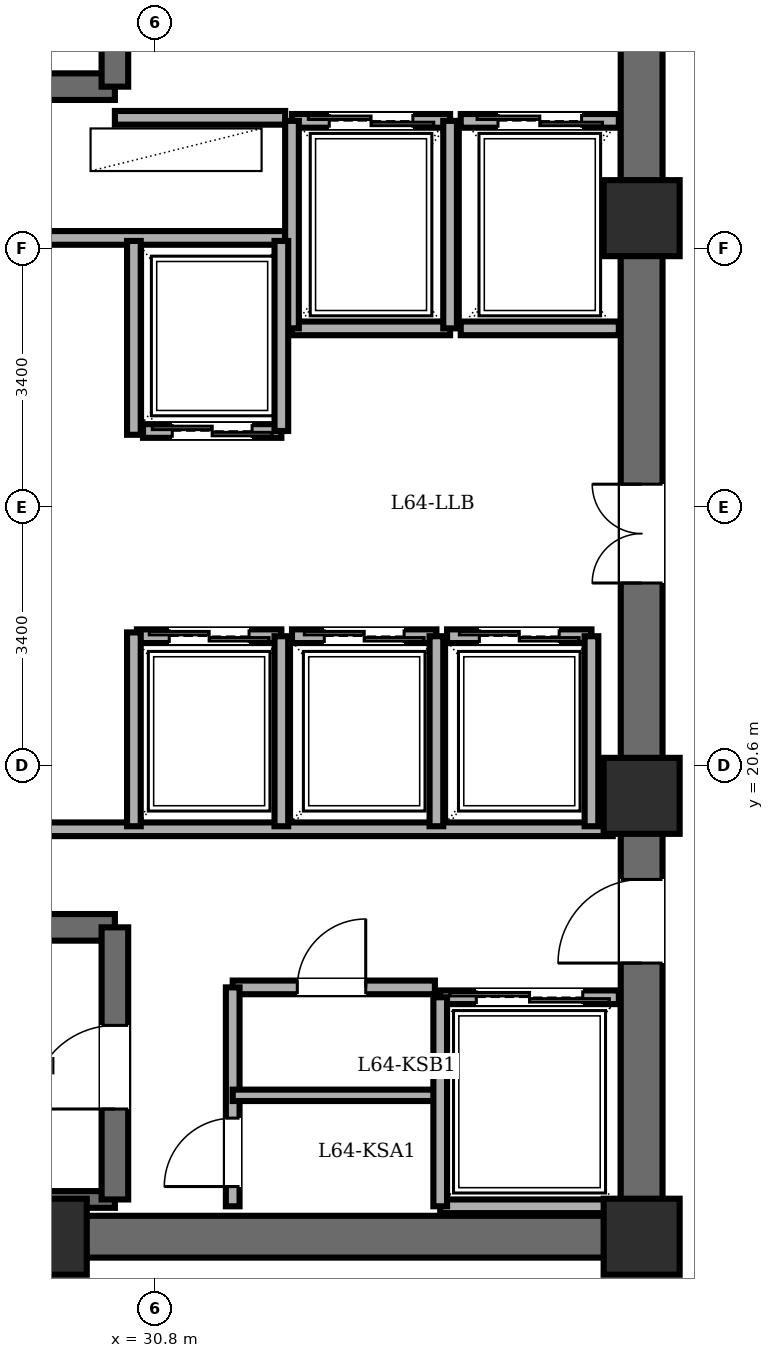
"""IFC4 building model, lengths in metres.
Left out: names, types, materials, properties, quantities, classifications, styles, units other than length and angle.
Written with IfcOpenShell. Run it as: python <this file> out.ifc"""

import sys

from ifc_helpers import new_model, si_unit, direction, frame, frame_2d, origin, origin_2d, place, context, subcontext, project, spatial, rectangle, extrude, element, fill, save


model = new_model("IFC4")
c1 = context("Model", 3, precision=1e-05, world=origin(), true_north=direction((0.0, 1.0)))
c2 = subcontext(c1, "Body", "Model", "MODEL_VIEW")
j1 = project(units=[si_unit("LENGTHUNIT", "METRE"), si_unit("PLANEANGLEUNIT", "RADIAN")], contexts=[c1])
p1 = place(None, origin())
s1 = spatial("IfcSite", under=j1, at=p1, CompositionType="ELEMENT")
p2 = place(p1, origin())
s2 = spatial("IfcBuilding", under=s1, at=p2, CompositionType="ELEMENT")
p3 = place(p2, frame((0.0, 0.0, 244.5)))
s3 = spatial("IfcBuildingStorey", under=s2, at=p3, CompositionType="ELEMENT", Elevation=244.5)
for number, where, z_axis, x_axis in (
    (1, (29.4, 14.4, 0.0), (0.0, 0.0, 1.0), (1.0, 0.0, 0.0)),
    (2, (37.2, 14.4, 0.0), (0.0, 0.0, 1.0), (1.0, 0.0, 0.0)),
    (3, (37.2, 20.2, 0.0), (0.0, 0.0, 1.0), (1.0, 0.0, 0.0)),
    (4, (37.2, 27.8, 0.0), (0.0, 0.0, 1.0), (1.0, 0.0, 0.0)),
):
    element("IfcColumn", number, at=place(p3, frame(where, z_axis=z_axis, x_axis=x_axis)), inside=s3, PredefinedType="COLUMN", context=c2, shape_type="SweptSolid", body=[
        extrude(rectangle(XDim=1.0, YDim=1.0, at=origin_2d()), origin(), (0.0, 0.0, 1.0), 3.6),
    ])
p4 = place(p3, frame((37.2, 14.4, 0.0), z_axis=(0.0, 0.0, 1.0), x_axis=(-1.0, 0.0, 0.0)))
e5 = element("IfcWall", 5, at=p4, inside=s3, PredefinedType="SHEAR", context=c2, shape_type="SweptSolid", body=[
    extrude(rectangle(XDim=15.6, YDim=0.55, at=frame_2d((7.8, 0.0))), origin(), (0.0, 0.0, 1.0), 3.36),
])
p5 = place(p3, frame((37.2, 14.4, 0.0), z_axis=(0.0, 0.0, 1.0), x_axis=(0.0, 1.0, 0.0)))
e6 = element("IfcWall", 6, at=p5, inside=s3, PredefinedType="SHEAR", context=c2, shape_type="SweptSolid", body=[
    extrude(rectangle(XDim=19.2, YDim=0.55, at=frame_2d((9.6, 0.0))), origin(), (0.0, 0.0, 1.0), 3.36),
])
p6 = place(p5, frame((15.8, 0.0, 0.0)))
e7 = element("IfcOpeningElement", 7, at=p6, cuts=e6, PredefinedType="OPENING", context=c2, shape_type="SweptSolid", body=[
    extrude(rectangle(XDim=1.15, YDim=2.15, at=frame_2d((0.575, 1.075))), frame((0.0, 0.285, 0.0), z_axis=(0.0, -1.0, 0.0), x_axis=(1.0, 0.0, 0.0)), (0.0, 0.0, 1.0), 0.57),
])
p7 = place(p5, frame((3.6, 0.0, 0.0)))
e8 = element("IfcOpeningElement", 8, at=p7, cuts=e6, PredefinedType="OPENING", context=c2, shape_type="SweptSolid", body=[
    extrude(rectangle(XDim=1.1, YDim=2.15, at=frame_2d((0.55, 1.075))), frame((0.0, 0.285, 0.0), z_axis=(0.0, -1.0, 0.0), x_axis=(1.0, 0.0, 0.0)), (0.0, 0.0, 1.0), 0.57),
])
p8 = place(p5, frame((8.6, 0.0, 0.0)))
e9 = element("IfcOpeningElement", 9, at=p8, cuts=e6, PredefinedType="OPENING", context=c2, shape_type="SweptSolid", body=[
    extrude(rectangle(XDim=1.3, YDim=2.2, at=frame_2d((0.65, 1.1))), frame((0.0, 0.285, 0.0), z_axis=(0.0, -1.0, 0.0), x_axis=(1.0, 0.0, 0.0)), (0.0, 0.0, 1.0), 0.57),
])
p9 = place(p3, frame((22.48, 29.53, 0.0), z_axis=(0.0, 0.0, 1.0), x_axis=(1.0, 0.0, 0.0)))
e10 = element("IfcWall", 10, at=p9, inside=s3, PredefinedType="SOLIDWALL", context=c2, shape_type="SweptSolid", body=[
    extrude(rectangle(XDim=7.79, YDim=0.35, at=frame_2d((3.895, 0.0))), origin(), (0.0, 0.0, 1.0), 3.36),
])
p10 = place(p3, frame((30.27, 29.53, 0.0), z_axis=(0.0, 0.0, 1.0), x_axis=(0.0, 1.0, 0.0)))
e11 = element("IfcWall", 11, at=p10, inside=s3, PredefinedType="SOLIDWALL", context=c2, shape_type="SweptSolid", body=[
    extrude(rectangle(XDim=3.58, YDim=0.35, at=frame_2d((1.79, 0.0))), origin(), (0.0, 0.0, 1.0), 3.36),
])
p11 = place(p10, frame((1.25, 0.0, 0.0)))
e12 = element("IfcOpeningElement", 12, at=p11, cuts=e11, PredefinedType="OPENING", context=c2, shape_type="SweptSolid", body=[
    extrude(rectangle(XDim=1.1, YDim=2.15, at=frame_2d((0.55, 1.075))), frame((0.0, 0.185, 0.0), z_axis=(0.0, -1.0, 0.0), x_axis=(1.0, 0.0, 0.0)), (0.0, 0.0, 1.0), 0.37),
])
p12 = place(p3, frame((22.48, 18.47, 0.0), z_axis=(0.0, 0.0, 1.0), x_axis=(1.0, 0.0, 0.0)))
e13 = element("IfcWall", 13, at=p12, inside=s3, PredefinedType="SOLIDWALL", context=c2, shape_type="SweptSolid", body=[
    extrude(rectangle(XDim=7.79, YDim=0.35, at=frame_2d((3.895, 0.0))), origin(), (0.0, 0.0, 1.0), 3.36),
])
p13 = place(p3, frame((22.48, 14.89, 0.0), z_axis=(0.0, 0.0, 1.0), x_axis=(1.0, 0.0, 0.0)))
e14 = element("IfcWall", 14, at=p13, inside=s3, PredefinedType="PARTITIONING", context=c2, shape_type="SweptSolid", body=[
    extrude(rectangle(XDim=7.79, YDim=0.22, at=frame_2d((3.895, 0.0))), origin(), (0.0, 0.0, 1.0), 3.36),
])
p14 = place(p3, frame((30.27, 14.89, 0.0), z_axis=(0.0, 0.0, 1.0), x_axis=(0.0, 1.0, 0.0)))
e15 = element("IfcWall", 15, at=p14, inside=s3, PredefinedType="SOLIDWALL", context=c2, shape_type="SweptSolid", body=[
    extrude(rectangle(XDim=3.58, YDim=0.35, at=frame_2d((1.79, 0.0))), origin(), (0.0, 0.0, 1.0), 3.36),
])
p15 = place(p14, frame((1.19, 0.0, 0.0)))
e16 = element("IfcOpeningElement", 16, at=p15, cuts=e15, PredefinedType="OPENING", context=c2, shape_type="SweptSolid", body=[
    extrude(rectangle(XDim=1.1, YDim=2.15, at=frame_2d((0.55, 1.075))), frame((0.0, 0.185, 0.0), z_axis=(0.0, -1.0, 0.0), x_axis=(1.0, 0.0, 0.0)), (0.0, 0.0, 1.0), 0.37),
])
p16 = place(p3, frame((30.27, 29.12, 0.0), z_axis=(0.0, 0.0, 1.0), x_axis=(1.0, 0.0, 0.0)))
e17 = element("IfcWall", 17, at=p16, inside=s3, PredefinedType="PARTITIONING", context=c2, shape_type="SweptSolid", body=[
    extrude(rectangle(XDim=2.24, YDim=0.18, at=frame_2d((1.12, 0.0))), origin(), (0.0, 0.0, 1.0), 3.36),
])
p17 = place(p3, frame((21.95, 27.54, 0.0), z_axis=(0.0, 0.0, 1.0), x_axis=(1.0, 0.0, 0.0)))
e18 = element("IfcWall", 18, at=p17, inside=s3, PredefinedType="PARTITIONING", context=c2, shape_type="SweptSolid", body=[
    extrude(rectangle(XDim=10.56, YDim=0.18, at=frame_2d((5.28, 0.0))), origin(), (0.0, 0.0, 1.0), 3.36),
])
p18 = place(p3, frame((21.95, 19.76, 0.0), z_axis=(0.0, 0.0, 1.0), x_axis=(1.0, 0.0, 0.0)))
e19 = element("IfcWall", 19, at=p18, inside=s3, PredefinedType="PARTITIONING", context=c2, shape_type="SweptSolid", body=[
    extrude(rectangle(XDim=14.87, YDim=0.18, at=frame_2d((7.435, 0.0))), origin(), (0.0, 0.0, 1.0), 3.36),
])
p19 = place(p3, frame((31.82, 17.68, 0.0), z_axis=(0.0, 0.0, 1.0), x_axis=(1.0, 0.0, 0.0)))
e20 = element("IfcWall", 20, at=p19, inside=s3, PredefinedType="PARTITIONING", context=c2, shape_type="SweptSolid", body=[
    extrude(rectangle(XDim=2.66, YDim=0.18, at=frame_2d((1.33, 0.0))), origin(), (0.0, 0.0, 1.0), 3.36),
])
p20 = place(p19, frame((0.85, 0.0, 0.0)))
e21 = element("IfcOpeningElement", 21, at=p20, cuts=e20, PredefinedType="OPENING", context=c2, shape_type="SweptSolid", body=[
    extrude(rectangle(XDim=0.9, YDim=2.05, at=frame_2d((0.45, 1.025))), frame((0.0, 0.1, 0.0), z_axis=(0.0, -1.0, 0.0), x_axis=(1.0, 0.0, 0.0)), (0.0, 0.0, 1.0), 0.2),
])
p21 = place(p3, frame((31.82, 14.8, 0.0), z_axis=(0.0, 0.0, 1.0), x_axis=(0.0, 1.0, 0.0)))
e22 = element("IfcWall", 22, at=p21, inside=s3, PredefinedType="PARTITIONING", context=c2, shape_type="SweptSolid", body=[
    extrude(rectangle(XDim=2.88, YDim=0.18, at=frame_2d((1.44, 0.0))), origin(), (0.0, 0.0, 1.0), 3.36),
])
p22 = place(p21, frame((0.26, 0.0, 0.0)))
e23 = element("IfcOpeningElement", 23, at=p22, cuts=e22, PredefinedType="OPENING", context=c2, shape_type="SweptSolid", body=[
    extrude(rectangle(XDim=0.9, YDim=2.05, at=frame_2d((0.45, 1.025))), frame((0.0, 0.1, 0.0), z_axis=(0.0, -1.0, 0.0), x_axis=(1.0, 0.0, 0.0)), (0.0, 0.0, 1.0), 0.2),
])
p23 = place(p3, frame((31.82, 16.26, 0.0), z_axis=(0.0, 0.0, 1.0), x_axis=(1.0, 0.0, 0.0)))
e24 = element("IfcWall", 24, at=p23, inside=s3, PredefinedType="PARTITIONING", context=c2, shape_type="SweptSolid", body=[
    extrude(rectangle(XDim=2.66, YDim=0.15, at=frame_2d((1.33, 0.0))), origin(), (0.0, 0.0, 1.0), 3.36),
])
p24 = place(p3, frame((32.6, 29.08, 0.0), z_axis=(0.0, 0.0, 1.0), x_axis=(1.0, 0.0, 0.0)))
e25 = element("IfcWall", 25, at=p24, inside=s3, PredefinedType="PARTITIONING", context=c2, shape_type="SweptSolid", body=[
    extrude(rectangle(XDim=2.08, YDim=0.18, at=frame_2d((1.04, 0.0))), origin(), (0.0, 0.0, 1.0), 3.36),
])
p25 = place(p24, frame((0.49, 0.0, 0.0)))
e26 = element("IfcOpeningElement", 26, at=p25, cuts=e25, PredefinedType="OPENING", context=c2, shape_type="SweptSolid", body=[
    extrude(rectangle(XDim=1.1, YDim=2.2, at=frame_2d((0.55, 1.1))), frame((0.0, 0.1, 0.0), z_axis=(0.0, -1.0, 0.0), x_axis=(1.0, 0.0, 0.0)), (0.0, 0.0, 1.0), 0.2),
])
p26 = place(p3, frame((34.68, 26.35, 0.0), z_axis=(0.0, 0.0, 1.0), x_axis=(-1.0, 0.0, 0.0)))
e27 = element("IfcWall", 27, at=p26, inside=s3, PredefinedType="PARTITIONING", context=c2, shape_type="SweptSolid", body=[
    extrude(rectangle(XDim=2.08, YDim=0.18, at=frame_2d((1.04, 0.0))), origin(), (0.0, 0.0, 1.0), 3.36),
])
for number, where, z_axis, x_axis in (
    (28, (34.68, 26.35, 0.0), (0.0, 0.0, 1.0), (0.0, 1.0, 0.0)),
    (29, (32.6, 29.08, 0.0), (0.0, 0.0, 1.0), (0.0, -1.0, 0.0)),
):
    element("IfcWall", number, at=place(p3, frame(where, z_axis=z_axis, x_axis=x_axis)), inside=s3, PredefinedType="PARTITIONING", context=c2, shape_type="SweptSolid", body=[
        extrude(rectangle(XDim=2.73, YDim=0.18, at=frame_2d((1.365, 0.0))), origin(), (0.0, 0.0, 1.0), 3.36),
    ])
p27 = place(p3, frame((34.82, 29.08, 0.0), z_axis=(0.0, 0.0, 1.0), x_axis=(1.0, 0.0, 0.0)))
e30 = element("IfcWall", 30, at=p27, inside=s3, PredefinedType="PARTITIONING", context=c2, shape_type="SweptSolid", body=[
    extrude(rectangle(XDim=2.08, YDim=0.18, at=frame_2d((1.04, 0.0))), origin(), (0.0, 0.0, 1.0), 3.36),
])
p28 = place(p27, frame((0.49, 0.0, 0.0)))
e31 = element("IfcOpeningElement", 31, at=p28, cuts=e30, PredefinedType="OPENING", context=c2, shape_type="SweptSolid", body=[
    extrude(rectangle(XDim=1.1, YDim=2.2, at=frame_2d((0.55, 1.1))), frame((0.0, 0.1, 0.0), z_axis=(0.0, -1.0, 0.0), x_axis=(1.0, 0.0, 0.0)), (0.0, 0.0, 1.0), 0.2),
])
p29 = place(p3, frame((36.9, 26.35, 0.0), z_axis=(0.0, 0.0, 1.0), x_axis=(-1.0, 0.0, 0.0)))
e32 = element("IfcWall", 32, at=p29, inside=s3, PredefinedType="PARTITIONING", context=c2, shape_type="SweptSolid", body=[
    extrude(rectangle(XDim=2.08, YDim=0.18, at=frame_2d((1.04, 0.0))), origin(), (0.0, 0.0, 1.0), 3.36),
])
p30 = place(p3, frame((34.55, 17.55, 0.0), z_axis=(0.0, 0.0, 1.0), x_axis=(1.0, 0.0, 0.0)))
e33 = element("IfcWall", 33, at=p30, inside=s3, PredefinedType="PARTITIONING", context=c2, shape_type="SweptSolid", body=[
    extrude(rectangle(XDim=2.35, YDim=0.18, at=frame_2d((1.175, 0.0))), origin(), (0.0, 0.0, 1.0), 3.36),
])
p31 = place(p30, frame((0.475, 0.0, 0.0)))
e34 = element("IfcOpeningElement", 34, at=p31, cuts=e33, PredefinedType="OPENING", context=c2, shape_type="SweptSolid", body=[
    extrude(rectangle(XDim=1.4, YDim=2.3, at=frame_2d((0.7, 1.15))), frame((0.0, 0.1, 0.0), z_axis=(0.0, -1.0, 0.0), x_axis=(1.0, 0.0, 0.0)), (0.0, 0.0, 1.0), 0.2),
])
p32 = place(p3, frame((36.9, 14.8, 0.0), z_axis=(0.0, 0.0, 1.0), x_axis=(-1.0, 0.0, 0.0)))
e35 = element("IfcWall", 35, at=p32, inside=s3, PredefinedType="PARTITIONING", context=c2, shape_type="SweptSolid", body=[
    extrude(rectangle(XDim=2.35, YDim=0.18, at=frame_2d((1.175, 0.0))), origin(), (0.0, 0.0, 1.0), 3.36),
])
p33 = place(p3, frame((34.55, 17.55, 0.0), z_axis=(0.0, 0.0, 1.0), x_axis=(0.0, -1.0, 0.0)))
e36 = element("IfcWall", 36, at=p33, inside=s3, PredefinedType="PARTITIONING", context=c2, shape_type="SweptSolid", body=[
    extrude(rectangle(XDim=2.75, YDim=0.18, at=frame_2d((1.375, 0.0))), origin(), (0.0, 0.0, 1.0), 3.36),
])
p34 = place(p3, frame((32.46, 25.0, 0.0), z_axis=(0.0, 0.0, 1.0), x_axis=(-1.0, 0.0, 0.0)))
e37 = element("IfcWall", 37, at=p34, inside=s3, PredefinedType="PARTITIONING", context=c2, shape_type="SweptSolid", body=[
    extrude(rectangle(XDim=1.82, YDim=0.18, at=frame_2d((0.91, 0.0))), origin(), (0.0, 0.0, 1.0), 3.36),
])
p35 = place(p34, frame((0.385, 0.0, 0.0)))
e38 = element("IfcOpeningElement", 38, at=p35, cuts=e37, PredefinedType="OPENING", context=c2, shape_type="SweptSolid", body=[
    extrude(rectangle(XDim=1.05, YDim=2.2, at=frame_2d((0.525, 1.1))), frame((0.0, 0.1, 0.0), z_axis=(0.0, -1.0, 0.0), x_axis=(1.0, 0.0, 0.0)), (0.0, 0.0, 1.0), 0.2),
])
p36 = place(p3, frame((32.46, 25.0, 0.0), z_axis=(0.0, 0.0, 1.0), x_axis=(0.0, 1.0, 0.0)))
e39 = element("IfcWall", 39, at=p36, inside=s3, PredefinedType="PARTITIONING", context=c2, shape_type="SweptSolid", body=[
    extrude(rectangle(XDim=2.5, YDim=0.18, at=frame_2d((1.25, 0.0))), origin(), (0.0, 0.0, 1.0), 3.36),
])
p37 = place(p3, frame((30.56, 22.3, 0.0), z_axis=(0.0, 0.0, 1.0), x_axis=(1.0, 0.0, 0.0)))
e40 = element("IfcWall", 40, at=p37, inside=s3, PredefinedType="PARTITIONING", context=c2, shape_type="SweptSolid", body=[
    extrude(rectangle(XDim=1.9, YDim=0.18, at=frame_2d((0.95, 0.0))), origin(), (0.0, 0.0, 1.0), 3.36),
])
p38 = place(p37, frame((0.425, 0.0, 0.0)))
e41 = element("IfcOpeningElement", 41, at=p38, cuts=e40, PredefinedType="OPENING", context=c2, shape_type="SweptSolid", body=[
    extrude(rectangle(XDim=1.05, YDim=2.2, at=frame_2d((0.525, 1.1))), frame((0.0, 0.1, 0.0), z_axis=(0.0, -1.0, 0.0), x_axis=(1.0, 0.0, 0.0)), (0.0, 0.0, 1.0), 0.2),
])
p39 = place(p3, frame((32.46, 19.8, 0.0), z_axis=(0.0, 0.0, 1.0), x_axis=(0.0, 1.0, 0.0)))
e42 = element("IfcWall", 42, at=p39, inside=s3, PredefinedType="PARTITIONING", context=c2, shape_type="SweptSolid", body=[
    extrude(rectangle(XDim=2.5, YDim=0.18, at=frame_2d((1.25, 0.0))), origin(), (0.0, 0.0, 1.0), 3.36),
])
p40 = place(p3, frame((32.6, 22.3, 0.0), z_axis=(0.0, 0.0, 1.0), x_axis=(1.0, 0.0, 0.0)))
e43 = element("IfcWall", 43, at=p40, inside=s3, PredefinedType="PARTITIONING", context=c2, shape_type="SweptSolid", body=[
    extrude(rectangle(XDim=1.9, YDim=0.18, at=frame_2d((0.95, 0.0))), origin(), (0.0, 0.0, 1.0), 3.36),
])
p41 = place(p40, frame((0.425, 0.0, 0.0)))
e44 = element("IfcOpeningElement", 44, at=p41, cuts=e43, PredefinedType="OPENING", context=c2, shape_type="SweptSolid", body=[
    extrude(rectangle(XDim=1.05, YDim=2.2, at=frame_2d((0.525, 1.1))), frame((0.0, 0.1, 0.0), z_axis=(0.0, -1.0, 0.0), x_axis=(1.0, 0.0, 0.0)), (0.0, 0.0, 1.0), 0.2),
])
p42 = place(p3, frame((34.5, 19.8, 0.0), z_axis=(0.0, 0.0, 1.0), x_axis=(0.0, 1.0, 0.0)))
e45 = element("IfcWall", 45, at=p42, inside=s3, PredefinedType="PARTITIONING", context=c2, shape_type="SweptSolid", body=[
    extrude(rectangle(XDim=2.5, YDim=0.18, at=frame_2d((1.25, 0.0))), origin(), (0.0, 0.0, 1.0), 3.36),
])
p43 = place(p3, frame((34.64, 22.3, 0.0), z_axis=(0.0, 0.0, 1.0), x_axis=(1.0, 0.0, 0.0)))
e46 = element("IfcWall", 46, at=p43, inside=s3, PredefinedType="PARTITIONING", context=c2, shape_type="SweptSolid", body=[
    extrude(rectangle(XDim=1.9, YDim=0.18, at=frame_2d((0.95, 0.0))), origin(), (0.0, 0.0, 1.0), 3.36),
])
p44 = place(p43, frame((0.425, 0.0, 0.0)))
e47 = element("IfcOpeningElement", 47, at=p44, cuts=e46, PredefinedType="OPENING", context=c2, shape_type="SweptSolid", body=[
    extrude(rectangle(XDim=1.05, YDim=2.2, at=frame_2d((0.525, 1.1))), frame((0.0, 0.1, 0.0), z_axis=(0.0, -1.0, 0.0), x_axis=(1.0, 0.0, 0.0)), (0.0, 0.0, 1.0), 0.2),
])
p45 = place(p3, frame((36.54, 19.8, 0.0), z_axis=(0.0, 0.0, 1.0), x_axis=(0.0, 1.0, 0.0)))
e48 = element("IfcWall", 48, at=p45, inside=s3, PredefinedType="PARTITIONING", context=c2, shape_type="SweptSolid", body=[
    extrude(rectangle(XDim=2.5, YDim=0.18, at=frame_2d((1.25, 0.0))), origin(), (0.0, 0.0, 1.0), 3.36),
])
for number, where, z_axis, x_axis in (
    (49, (30.52, 24.95, 0.0), (0.0, 0.0, 1.0), (0.0, 1.0, 0.0)),
    (50, (30.52, 19.8, 0.0), (0.0, 0.0, 1.0), (0.0, 1.0, 0.0)),
):
    element("IfcWall", number, at=place(p3, frame(where, z_axis=z_axis, x_axis=x_axis)), inside=s3, PredefinedType="PARTITIONING", context=c2, shape_type="SweptSolid", body=[
        extrude(rectangle(XDim=2.55, YDim=0.18, at=frame_2d((1.275, 0.0))), origin(), (0.0, 0.0, 1.0), 3.36),
    ])
p46 = place(p15, origin())
e51 = element("IfcDoor", 51, at=p46, inside=s3, OperationType="SINGLE_SWING_LEFT", PredefinedType="DOOR", context=c2, shape_type="SweptSolid", body=[
    extrude(rectangle(XDim=1.1, YDim=2.15, at=frame_2d((0.55, 1.075))), frame((0.0, 0.025, 0.0), z_axis=(0.0, -1.0, 0.0), x_axis=(1.0, 0.0, 0.0)), (0.0, 0.0, 1.0), 0.05),
])
fill(e16, e51)
p47 = place(p7, origin())
e52 = element("IfcDoor", 52, at=p47, inside=s3, OperationType="SINGLE_SWING_LEFT", PredefinedType="DOOR", context=c2, shape_type="SweptSolid", body=[
    extrude(rectangle(XDim=1.1, YDim=2.15, at=frame_2d((0.55, 1.075))), frame((0.0, 0.025, 0.0), z_axis=(0.0, -1.0, 0.0), x_axis=(1.0, 0.0, 0.0)), (0.0, 0.0, 1.0), 0.05),
])
fill(e8, e52)
p48 = place(p20, origin())
e53 = element("IfcDoor", 53, at=p48, inside=s3, OperationType="SINGLE_SWING_RIGHT", PredefinedType="DOOR", context=c2, shape_type="SweptSolid", body=[
    extrude(rectangle(XDim=0.9, YDim=2.05, at=frame_2d((0.45, 1.025))), frame((0.0, 0.025, 0.0), z_axis=(0.0, -1.0, 0.0), x_axis=(1.0, 0.0, 0.0)), (0.0, 0.0, 1.0), 0.05),
])
fill(e21, e53)
p49 = place(p22, origin())
e54 = element("IfcDoor", 54, at=p49, inside=s3, OperationType="SINGLE_SWING_LEFT", PredefinedType="DOOR", context=c2, shape_type="SweptSolid", body=[
    extrude(rectangle(XDim=0.9, YDim=2.05, at=frame_2d((0.45, 1.025))), frame((0.0, 0.025, 0.0), z_axis=(0.0, -1.0, 0.0), x_axis=(1.0, 0.0, 0.0)), (0.0, 0.0, 1.0), 0.05),
])
fill(e23, e54)
p50 = place(p25, origin())
e55 = element("IfcDoor", 55, at=p50, inside=s3, OperationType="DOUBLE_DOOR_SLIDING", PredefinedType="DOOR", context=c2, shape_type="SweptSolid", body=[
    extrude(rectangle(XDim=1.1, YDim=2.2, at=frame_2d((0.55, 1.1))), frame((0.0, 0.025, 0.0), z_axis=(0.0, -1.0, 0.0), x_axis=(1.0, 0.0, 0.0)), (0.0, 0.0, 1.0), 0.05),
])
fill(e26, e55)
p51 = place(p28, origin())
e56 = element("IfcDoor", 56, at=p51, inside=s3, OperationType="DOUBLE_DOOR_SLIDING", PredefinedType="DOOR", context=c2, shape_type="SweptSolid", body=[
    extrude(rectangle(XDim=1.1, YDim=2.2, at=frame_2d((0.55, 1.1))), frame((0.0, 0.025, 0.0), z_axis=(0.0, -1.0, 0.0), x_axis=(1.0, 0.0, 0.0)), (0.0, 0.0, 1.0), 0.05),
])
fill(e31, e56)
p52 = place(p31, origin())
e57 = element("IfcDoor", 57, at=p52, inside=s3, OperationType="DOUBLE_DOOR_SLIDING", PredefinedType="DOOR", context=c2, shape_type="SweptSolid", body=[
    extrude(rectangle(XDim=1.4, YDim=2.3, at=frame_2d((0.7, 1.15))), frame((0.0, 0.025, 0.0), z_axis=(0.0, -1.0, 0.0), x_axis=(1.0, 0.0, 0.0)), (0.0, 0.0, 1.0), 0.05),
])
fill(e34, e57)
p53 = place(p35, origin())
e58 = element("IfcDoor", 58, at=p53, inside=s3, OperationType="DOUBLE_DOOR_SLIDING", PredefinedType="DOOR", context=c2, shape_type="SweptSolid", body=[
    extrude(rectangle(XDim=1.05, YDim=2.2, at=frame_2d((0.525, 1.1))), frame((0.0, 0.025, 0.0), z_axis=(0.0, -1.0, 0.0), x_axis=(1.0, 0.0, 0.0)), (0.0, 0.0, 1.0), 0.05),
])
fill(e38, e58)
p54 = place(p38, origin())
e59 = element("IfcDoor", 59, at=p54, inside=s3, OperationType="DOUBLE_DOOR_SLIDING", PredefinedType="DOOR", context=c2, shape_type="SweptSolid", body=[
    extrude(rectangle(XDim=1.05, YDim=2.2, at=frame_2d((0.525, 1.1))), frame((0.0, 0.025, 0.0), z_axis=(0.0, -1.0, 0.0), x_axis=(1.0, 0.0, 0.0)), (0.0, 0.0, 1.0), 0.05),
])
fill(e41, e59)
p55 = place(p41, origin())
e60 = element("IfcDoor", 60, at=p55, inside=s3, OperationType="DOUBLE_DOOR_SLIDING", PredefinedType="DOOR", context=c2, shape_type="SweptSolid", body=[
    extrude(rectangle(XDim=1.05, YDim=2.2, at=frame_2d((0.525, 1.1))), frame((0.0, 0.025, 0.0), z_axis=(0.0, -1.0, 0.0), x_axis=(1.0, 0.0, 0.0)), (0.0, 0.0, 1.0), 0.05),
])
fill(e44, e60)
p56 = place(p44, origin())
e61 = element("IfcDoor", 61, at=p56, inside=s3, OperationType="DOUBLE_DOOR_SLIDING", PredefinedType="DOOR", context=c2, shape_type="SweptSolid", body=[
    extrude(rectangle(XDim=1.05, YDim=2.2, at=frame_2d((0.525, 1.1))), frame((0.0, 0.025, 0.0), z_axis=(0.0, -1.0, 0.0), x_axis=(1.0, 0.0, 0.0)), (0.0, 0.0, 1.0), 0.05),
])
fill(e47, e61)
p57 = place(p8, origin())
e62 = element("IfcDoor", 62, at=p57, inside=s3, OperationType="DOUBLE_DOOR_SINGLE_SWING", PredefinedType="DOOR", context=c2, shape_type="SweptSolid", body=[
    extrude(rectangle(XDim=1.3, YDim=2.2, at=frame_2d((0.65, 1.1))), frame((0.0, 0.025, 0.0), z_axis=(0.0, -1.0, 0.0), x_axis=(1.0, 0.0, 0.0)), (0.0, 0.0, 1.0), 0.05),
])
fill(e9, e62)
save(model, sys.argv[1])
